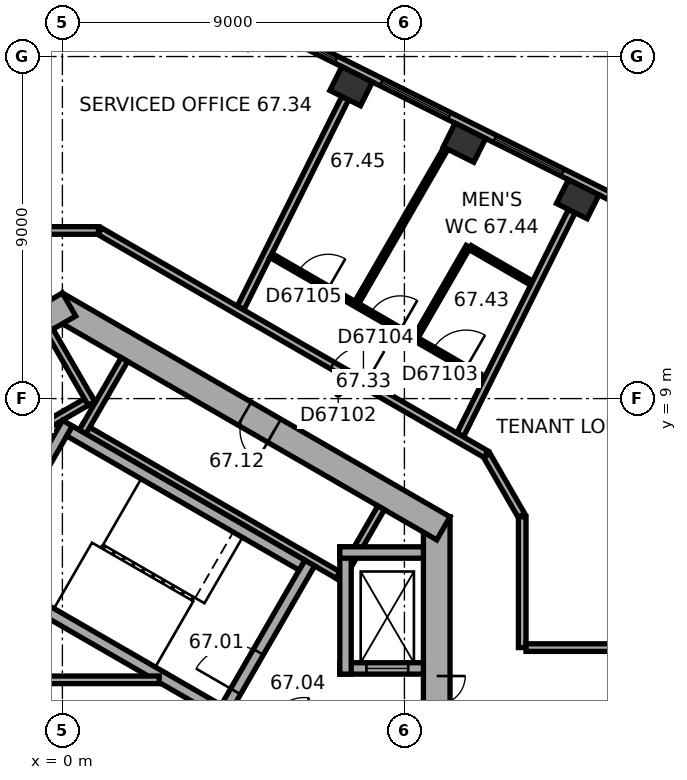
"""IFC4 building model, lengths in metres.
Left out: names, types, materials, properties, quantities, classifications, styles, units other than length and angle.
Written with IfcOpenShell. Run it as: python <this file> out.ifc"""

import sys

from ifc_helpers import new_model, si_unit, direction, frame, frame_2d, origin, origin_2d, place, context, subcontext, project, spatial, rectangle, extrude, element, fill, save


model = new_model("IFC4")
c1 = context("Model", 3, precision=1e-05, world=origin(), true_north=direction((0.0, 1.0)))
c2 = subcontext(c1, "Body", "Model", "MODEL_VIEW")
j1 = project(units=[si_unit("LENGTHUNIT", "METRE"), si_unit("PLANEANGLEUNIT", "RADIAN")], contexts=[c1])
p1 = place(None, origin())
s1 = spatial("IfcSite", under=j1, at=p1, CompositionType="ELEMENT")
p2 = place(p1, origin())
s2 = spatial("IfcBuilding", under=s1, at=p2, CompositionType="ELEMENT")
p3 = place(p2, frame((0.0, 0.0, 270.9)))
s3 = spatial("IfcBuildingStorey", under=s2, at=p3, CompositionType="ELEMENT", Elevation=270.9)
for number, where, z_axis, x_axis in (
    (1, (13.561, 14.246, 0.0), (0.0, 0.0, 1.0), (-0.895, 0.446, 0.0)),
    (2, (10.58, 15.732, 0.0), (0.0, 0.0, 1.0), (-0.895, 0.446, 0.0)),
    (3, (7.598, 17.219, 0.0), (0.0, 0.0, 1.0), (-0.895, 0.446, 0.0)),
):
    element("IfcColumn", number, at=place(p3, frame(where, z_axis=z_axis, x_axis=x_axis)), inside=s3, PredefinedType="COLUMN", context=c2, shape_type="SweptSolid", body=[
        extrude(rectangle(XDim=0.9, YDim=0.7, at=origin_2d()), origin(), (0.0, 0.0, 1.0), 3.7),
    ])
p4 = place(p3, frame((9.85, -5.889, 0.0), z_axis=(0.0, 0.0, 1.0), x_axis=(0.0, 1.0, 0.0)))
e4 = element("IfcWall", 4, at=p4, inside=s3, PredefinedType="SHEAR", context=c2, shape_type="SweptSolid", body=[
    extrude(rectangle(XDim=11.778, YDim=0.7, at=frame_2d((5.889, 0.0))), origin(), (0.0, 0.0, 1.0), 3.7),
])
p5 = place(p4, frame((6.089, 0.0, 0.0)))
e5 = element("IfcOpeningElement", 5, at=p5, cuts=e4, PredefinedType="OPENING", context=c2, shape_type="SweptSolid", body=[
    extrude(rectangle(XDim=1.5, YDim=2.1, at=frame_2d((0.75, 1.05))), frame((0.0, 0.36, 0.0), z_axis=(0.0, -1.0, 0.0), x_axis=(1.0, 0.0, 0.0)), (0.0, 0.0, 1.0), 0.72),
])
p6 = place(p4, frame((1.639, 0.0, 0.0)))
e6 = element("IfcOpeningElement", 6, at=p6, cuts=e4, PredefinedType="OPENING", context=c2, shape_type="SweptSolid", body=[
    extrude(rectangle(XDim=0.9, YDim=2.1, at=frame_2d((0.45, 1.05))), frame((0.0, 0.36, 0.0), z_axis=(0.0, -1.0, 0.0), x_axis=(1.0, 0.0, 0.0)), (0.0, 0.0, 1.0), 0.72),
])
p7 = place(p4, frame((4.239, 0.0, 0.0)))
e7 = element("IfcOpeningElement", 7, at=p7, cuts=e4, PredefinedType="OPENING", context=c2, shape_type="SweptSolid", body=[
    extrude(rectangle(XDim=0.9, YDim=2.1, at=frame_2d((0.45, 1.05))), frame((0.0, 0.36, 0.0), z_axis=(0.0, -1.0, 0.0), x_axis=(1.0, 0.0, 0.0)), (0.0, 0.0, 1.0), 0.72),
])
p8 = place(p3, frame((10.025, 5.586, 0.0), z_axis=(0.0, 0.0, 1.0), x_axis=(-0.866026453023, 0.499998182661, 0.0)))
e8 = element("IfcWall", 8, at=p8, inside=s3, PredefinedType="SHEAR", context=c2, shape_type="SweptSolid", body=[
    extrude(rectangle(XDim=11.778, YDim=0.7, at=frame_2d((5.889, 0.0))), origin(), (0.0, 0.0, 1.0), 3.7),
])
p9 = place(p8, frame((5.139, 0.0, 0.0)))
e9 = element("IfcOpeningElement", 9, at=p9, cuts=e8, PredefinedType="OPENING", context=c2, shape_type="SweptSolid", body=[
    extrude(rectangle(XDim=0.9, YDim=2.1, at=frame_2d((0.45, 1.05))), frame((0.0, 0.36, 0.0), z_axis=(0.0, -1.0, 0.0), x_axis=(1.0, 0.0, 0.0)), (0.0, 0.0, 1.0), 0.72),
])
p10 = place(p3, frame((0.175, 11.475, 0.0), z_axis=(0.0, 0.0, 1.0), x_axis=(-0.866026453023, -0.499998182661, 0.0)))
e10 = element("IfcWall", 10, at=p10, inside=s3, PredefinedType="SHEAR", context=c2, shape_type="SweptSolid", body=[
    extrude(rectangle(XDim=11.778, YDim=0.7, at=frame_2d((5.889, 0.0))), origin(), (0.0, 0.0, 1.0), 3.7),
])
p11 = place(p10, frame((6.089, 0.0, 0.0)))
e11 = element("IfcOpeningElement", 11, at=p11, cuts=e10, PredefinedType="OPENING", context=c2, shape_type="SweptSolid", body=[
    extrude(rectangle(XDim=1.5, YDim=2.1, at=frame_2d((0.75, 1.05))), frame((0.0, 0.36, 0.0), z_axis=(0.0, -1.0, 0.0), x_axis=(1.0, 0.0, 0.0)), (0.0, 0.0, 1.0), 0.72),
])
p12 = place(p10, frame((1.639, 0.0, 0.0)))
e12 = element("IfcOpeningElement", 12, at=p12, cuts=e10, PredefinedType="OPENING", context=c2, shape_type="SweptSolid", body=[
    extrude(rectangle(XDim=0.9, YDim=2.1, at=frame_2d((0.45, 1.05))), frame((0.0, 0.36, 0.0), z_axis=(0.0, -1.0, 0.0), x_axis=(1.0, 0.0, 0.0)), (0.0, 0.0, 1.0), 0.72),
])
p13 = place(p10, frame((4.239, 0.0, 0.0)))
e13 = element("IfcOpeningElement", 13, at=p13, cuts=e10, PredefinedType="OPENING", context=c2, shape_type="SweptSolid", body=[
    extrude(rectangle(XDim=0.9, YDim=2.1, at=frame_2d((0.45, 1.05))), frame((0.0, 0.36, 0.0), z_axis=(0.0, -1.0, 0.0), x_axis=(1.0, 0.0, 0.0)), (0.0, 0.0, 1.0), 0.72),
])
p14 = place(p3, frame((17.223, 12.923, 0.0), z_axis=(0.0, 0.0, 1.0), x_axis=(-0.894930561148, 0.44620543556, 0.0)))
e14 = element("IfcWall", 14, at=p14, inside=s3, PredefinedType="STANDARD", context=c2, shape_type="SweptSolid", body=[
    extrude(rectangle(XDim=17.731, YDim=0.2, at=frame_2d((8.866, 0.0))), origin(), (0.0, 0.0, 1.0), 3.7),
])
p15 = place(p14, frame((1.202, 0.0, 0.9)))
e15 = element("IfcOpeningElement", 15, at=p15, cuts=e14, PredefinedType="OPENING", context=c2, shape_type="SweptSolid", body=[
    extrude(rectangle(XDim=2.0, YDim=2.0, at=frame_2d((1.0, 1.0))), frame((0.0, 0.11, 0.0), z_axis=(0.0, -1.0, 0.0), x_axis=(1.0, 0.0, 0.0)), (0.0, 0.0, 1.0), 0.22),
])
p16 = place(p14, frame((4.533, 0.0, 0.9)))
e16 = element("IfcOpeningElement", 16, at=p16, cuts=e14, PredefinedType="OPENING", context=c2, shape_type="SweptSolid", body=[
    extrude(rectangle(XDim=2.0, YDim=2.0, at=frame_2d((1.0, 1.0))), frame((0.0, 0.11, 0.0), z_axis=(0.0, -1.0, 0.0), x_axis=(1.0, 0.0, 0.0)), (0.0, 0.0, 1.0), 0.22),
])
p17 = place(p14, frame((7.865, 0.0, 0.9)))
e17 = element("IfcOpeningElement", 17, at=p17, cuts=e14, PredefinedType="OPENING", context=c2, shape_type="SweptSolid", body=[
    extrude(rectangle(XDim=2.0, YDim=2.0, at=frame_2d((1.0, 1.0))), frame((0.0, 0.11, 0.0), z_axis=(0.0, -1.0, 0.0), x_axis=(1.0, 0.0, 0.0)), (0.0, 0.0, 1.0), 0.22),
])
p18 = place(p14, frame((11.197, 0.0, 0.9)))
e18 = element("IfcOpeningElement", 18, at=p18, cuts=e14, PredefinedType="OPENING", context=c2, shape_type="SweptSolid", body=[
    extrude(rectangle(XDim=2.0, YDim=2.0, at=frame_2d((1.0, 1.0))), frame((0.0, 0.11, 0.0), z_axis=(0.0, -1.0, 0.0), x_axis=(1.0, 0.0, 0.0)), (0.0, 0.0, 1.0), 0.22),
])
p19 = place(p14, frame((14.528, 0.0, 0.9)))
e19 = element("IfcOpeningElement", 19, at=p19, cuts=e14, PredefinedType="OPENING", context=c2, shape_type="SweptSolid", body=[
    extrude(rectangle(XDim=2.0, YDim=2.0, at=frame_2d((1.0, 1.0))), frame((0.0, 0.11, 0.0), z_axis=(0.0, -1.0, 0.0), x_axis=(1.0, 0.0, 0.0)), (0.0, 0.0, 1.0), 0.22),
])
p20 = place(p3, frame((7.424, 4.259, 0.0), z_axis=(0.0, 0.0, 1.0), x_axis=(-0.866026010844, 0.49999894854, 0.0)))
e20 = element("IfcWall", 20, at=p20, inside=s3, PredefinedType="PARTITIONING", context=c2, shape_type="SweptSolid", body=[
    extrude(rectangle(XDim=8.0, YDim=0.2, at=frame_2d((4.0, 0.0))), origin(), (0.0, 0.0, 1.0), 3.42),
])
for number, where, z_axis, x_axis in (
    (21, (7.287, 4.222, 0.0), (0.0, 0.0, 1.0), (0.5, 0.866, 0.0)),
    (22, (0.532, 8.122, 0.0), (0.0, 0.0, 1.0), (0.5, 0.866, 0.0)),
):
    element("IfcWall", number, at=place(p3, frame(where, z_axis=z_axis, x_axis=x_axis)), inside=s3, PredefinedType="PARTITIONING", context=c2, shape_type="SweptSolid", body=[
        extrude(rectangle(XDim=2.2, YDim=0.2, at=frame_2d((1.1, 0.0))), origin(), (0.0, 0.0, 1.0), 3.42),
    ])
p21 = place(p3, frame((0.803, 9.009, 0.0), z_axis=(0.0, 0.0, 1.0), x_axis=(-0.866028230842, -0.499995103361, 0.0)))
e23 = element("IfcWall", 23, at=p21, inside=s3, PredefinedType="PARTITIONING", context=c2, shape_type="SweptSolid", body=[
    extrude(rectangle(XDim=5.4, YDim=0.2, at=frame_2d((2.7, 0.0))), origin(), (0.0, 0.0, 1.0), 3.42),
])
p22 = place(p3, frame((0.767, 8.872, 0.0), z_axis=(0.0, 0.0, 1.0), x_axis=(-0.499994660107, 0.866028486751, 0.0)))
e24 = element("IfcWall", 24, at=p22, inside=s3, PredefinedType="PARTITIONING", context=c2, shape_type="SweptSolid", body=[
    extrude(rectangle(XDim=2.2, YDim=0.2, at=frame_2d((1.1, 0.0))), origin(), (0.0, 0.0, 1.0), 3.42),
])
p23 = place(p3, frame((4.158, 0.602, 0.0), z_axis=(0.0, 0.0, 1.0), x_axis=(0.499977259774, 0.866038532462, 0.0)))
e25 = element("IfcWall", 25, at=p23, inside=s3, PredefinedType="SHEAR", context=c2, shape_type="SweptSolid", body=[
    extrude(rectangle(XDim=4.7, YDim=0.3, at=frame_2d((2.35, 0.0))), origin(), (0.0, 0.0, 1.0), 3.42),
])
p24 = place(p23, frame((0.8, 0.0, 0.0)))
e26 = element("IfcOpeningElement", 26, at=p24, cuts=e25, PredefinedType="OPENING", context=c2, shape_type="SweptSolid", body=[
    extrude(rectangle(XDim=1.2, YDim=2.1, at=frame_2d((0.6, 1.05))), frame((0.0, 0.16, 0.0), z_axis=(0.0, -1.0, 0.0), x_axis=(1.0, 0.0, 0.0)), (0.0, 0.0, 1.0), 0.32),
])
p25 = place(p3, frame((-2.216, 4.282, 0.0), z_axis=(0.0, 0.0, 1.0), x_axis=(0.499977259774, 0.866038532462, 0.0)))
e27 = element("IfcWall", 27, at=p25, inside=s3, PredefinedType="SHEAR", context=c2, shape_type="SweptSolid", body=[
    extrude(rectangle(XDim=4.7, YDim=0.3, at=frame_2d((2.35, 0.0))), origin(), (0.0, 0.0, 1.0), 3.42),
])
for number, where, z_axis, x_axis in (
    (28, (4.103, 0.807, 0.0), (0.0, 0.0, 1.0), (-0.866, 0.5, 0.0)),
    (29, (6.303, 4.617, 0.0), (0.0, 0.0, 1.0), (-0.866, 0.5, 0.0)),
):
    element("IfcWall", number, at=place(p3, frame(where, z_axis=z_axis, x_axis=x_axis)), inside=s3, PredefinedType="SHEAR", context=c2, shape_type="SweptSolid", body=[
        extrude(rectangle(XDim=7.06, YDim=0.3, at=frame_2d((3.53, 0.0))), origin(), (0.0, 0.0, 1.0), 3.42),
    ])
p26 = place(p3, frame((7.3, 1.9, 0.0), z_axis=(0.0, 0.0, 1.0), x_axis=(1.0, 0.0, 0.0)))
e30 = element("IfcWall", 30, at=p26, inside=s3, PredefinedType="SHEAR", context=c2, shape_type="SweptSolid", body=[
    extrude(rectangle(XDim=2.2, YDim=0.3, at=frame_2d((1.1, 0.0))), origin(), (0.0, 0.0, 1.0), 3.42),
])
p27 = place(p26, frame((0.7, 0.0, 0.0)))
e31 = element("IfcOpeningElement", 31, at=p27, cuts=e30, PredefinedType="OPENING", context=c2, shape_type="SweptSolid", body=[
    extrude(rectangle(XDim=1.1, YDim=2.1, at=frame_2d((0.55, 1.05))), frame((0.0, 0.16, 0.0), z_axis=(0.0, -1.0, 0.0), x_axis=(1.0, 0.0, 0.0)), (0.0, 0.0, 1.0), 0.32),
])
p28 = place(p3, frame((7.45, 1.75, 0.0), z_axis=(0.0, 0.0, 1.0), x_axis=(0.0, 1.0, 0.0)))
e32 = element("IfcWall", 32, at=p28, inside=s3, PredefinedType="SHEAR", context=c2, shape_type="SweptSolid", body=[
    extrude(rectangle(XDim=3.35, YDim=0.3, at=frame_2d((1.675, 0.0))), origin(), (0.0, 0.0, 1.0), 3.42),
])
p29 = place(p3, frame((7.3, 4.95, 0.0), z_axis=(0.0, 0.0, 1.0), x_axis=(1.0, 0.0, 0.0)))
e33 = element("IfcWall", 33, at=p29, inside=s3, PredefinedType="SHEAR", context=c2, shape_type="SweptSolid", body=[
    extrude(rectangle(XDim=2.2, YDim=0.3, at=frame_2d((1.1, 0.0))), origin(), (0.0, 0.0, 1.0), 3.42),
])
p30 = place(p3, frame((-2.72, 1.6, 0.0), z_axis=(0.0, 0.0, 1.0), x_axis=(1.0, 0.0, 0.0)))
e34 = element("IfcWall", 34, at=p30, inside=s3, PredefinedType="PARTITIONING", context=c2, shape_type="SweptSolid", body=[
    extrude(rectangle(XDim=5.269, YDim=0.2, at=frame_2d((2.634, 0.0))), origin(), (0.0, 0.0, 1.0), 3.42),
])
p31 = place(p3, frame((0.95, 13.423, 0.0), z_axis=(0.0, 0.0, 1.0), x_axis=(-1.0, 0.0, 0.0)))
e35 = element("IfcWall", 35, at=p31, inside=s3, PredefinedType="PARTITIONING", context=c2, shape_type="SweptSolid", body=[
    extrude(rectangle(XDim=1.9, YDim=0.2, at=frame_2d((0.95, 0.0))), origin(), (0.0, 0.0, 1.0), 3.42),
])
p32 = place(p3, frame((7.442, 16.906, 0.0), z_axis=(0.0, 0.0, 1.0), x_axis=(-0.446183401262, -0.894941546939, 0.0)))
e36 = element("IfcWall", 36, at=p32, inside=s3, PredefinedType="PARTITIONING", context=c2, shape_type="SweptSolid", body=[
    extrude(rectangle(XDim=6.163, YDim=0.2, at=frame_2d((3.082, 0.0))), origin(), (0.0, 0.0, 1.0), 3.42),
])
p33 = place(p3, frame((10.091, 15.585, 0.0), z_axis=(0.0, 0.0, 1.0), x_axis=(-0.499969186147, -0.86604319344, 0.0)))
e37 = element("IfcWall", 37, at=p33, inside=s3, PredefinedType="PARTITIONING", context=c2, shape_type="SweptSolid", body=[
    extrude(rectangle(XDim=4.682, YDim=0.12, at=frame_2d((2.341, 0.0))), origin(), (0.0, 0.0, 1.0), 2.87),
])
p34 = place(p3, frame((10.679, 13.003, 0.0), z_axis=(0.0, 0.0, 1.0), x_axis=(-0.500048966069, -0.865997131366, 0.0)))
e38 = element("IfcWall", 38, at=p34, inside=s3, PredefinedType="PARTITIONING", context=c2, shape_type="SweptSolid", body=[
    extrude(rectangle(XDim=2.74, YDim=0.12, at=frame_2d((1.37, 0.0))), origin(), (0.0, 0.0, 1.0), 3.42),
])
p35 = place(p3, frame((11.097, 9.528, 0.0), z_axis=(0.0, 0.0, 1.0), x_axis=(-0.866039938485, 0.499974824316, 0.0)))
e39 = element("IfcWall", 39, at=p35, inside=s3, PredefinedType="PARTITIONING", context=c2, shape_type="SweptSolid", body=[
    extrude(rectangle(XDim=6.476, YDim=0.12, at=frame_2d((3.238, 0.0))), origin(), (0.0, 0.0, 1.0), 3.42),
])
p36 = place(p35, frame((0.55, 0.0, 0.0)))
e40 = element("IfcOpeningElement", 40, at=p36, cuts=e39, PredefinedType="OPENING", context=c2, shape_type="SweptSolid", body=[
    extrude(rectangle(XDim=1.0, YDim=2.1, at=frame_2d((0.5, 1.05))), frame((0.0, 0.07, 0.0), z_axis=(0.0, -1.0, 0.0), x_axis=(1.0, 0.0, 0.0)), (0.0, 0.0, 1.0), 0.14),
])
p37 = place(p35, frame((2.55, 0.0, 0.0)))
e41 = element("IfcOpeningElement", 41, at=p37, cuts=e39, PredefinedType="OPENING", context=c2, shape_type="SweptSolid", body=[
    extrude(rectangle(XDim=0.9, YDim=2.1, at=frame_2d((0.45, 1.05))), frame((0.0, 0.07, 0.0), z_axis=(0.0, -1.0, 0.0), x_axis=(1.0, 0.0, 0.0)), (0.0, 0.0, 1.0), 0.14),
])
p38 = place(p35, frame((4.738, 0.0, 0.0)))
e42 = element("IfcOpeningElement", 42, at=p38, cuts=e39, PredefinedType="OPENING", context=c2, shape_type="SweptSolid", body=[
    extrude(rectangle(XDim=0.9, YDim=2.1, at=frame_2d((0.45, 1.05))), frame((0.0, 0.07, 0.0), z_axis=(0.0, -1.0, 0.0), x_axis=(1.0, 0.0, 0.0)), (0.0, 0.0, 1.0), 0.14),
])
p39 = place(p3, frame((11.15, 7.534, 0.0), z_axis=(0.0, 0.0, 1.0), x_axis=(-0.866026603062, 0.499997922785, 0.0)))
e43 = element("IfcWall", 43, at=p39, inside=s3, PredefinedType="PARTITIONING", context=c2, shape_type="SweptSolid", body=[
    extrude(rectangle(XDim=11.738, YDim=0.2, at=frame_2d((5.869, 0.0))), origin(), (0.0, 0.0, 1.0), 3.42),
])
p40 = place(p39, frame((3.676, 0.0, 0.0)))
e44 = element("IfcOpeningElement", 44, at=p40, cuts=e43, PredefinedType="OPENING", context=c2, shape_type="SweptSolid", body=[
    extrude(rectangle(XDim=1.0, YDim=2.1, at=frame_2d((0.5, 1.05))), frame((0.0, 0.11, 0.0), z_axis=(0.0, -1.0, 0.0), x_axis=(1.0, 0.0, 0.0)), (0.0, 0.0, 1.0), 0.22),
])
p41 = place(p3, frame((12.08, 5.924, 0.0), z_axis=(0.0, 0.0, 1.0), x_axis=(-0.500004960326, 0.86602253992, 0.0)))
e45 = element("IfcWall", 45, at=p41, inside=s3, PredefinedType="PARTITIONING", context=c2, shape_type="SweptSolid", body=[
    extrude(rectangle(XDim=1.82, YDim=0.2, at=frame_2d((0.91, 0.0))), origin(), (0.0, 0.0, 1.0), 3.42),
])
p42 = place(p3, frame((12.1, 2.448, 0.0), z_axis=(0.0, 0.0, 1.0), x_axis=(0.0, 1.0, 0.0)))
e46 = element("IfcWall", 46, at=p42, inside=s3, PredefinedType="PARTITIONING", context=c2, shape_type="SweptSolid", body=[
    extrude(rectangle(XDim=3.441, YDim=0.2, at=frame_2d((1.72, 0.0))), origin(), (0.0, 0.0, 1.0), 3.42),
])
p43 = place(p3, frame((12.349, 12.038, 0.0), z_axis=(0.0, 0.0, 1.0), x_axis=(-0.866039825209, 0.499975020527, 0.0)))
e47 = element("IfcWall", 47, at=p43, inside=s3, PredefinedType="PARTITIONING", context=c2, shape_type="SweptSolid", body=[
    extrude(rectangle(XDim=1.869, YDim=0.12, at=frame_2d((0.934, 0.0))), origin(), (0.0, 0.0, 1.0), 3.42),
])
p44 = place(p3, frame((13.405, 13.933, 0.0), z_axis=(0.0, 0.0, 1.0), x_axis=(-0.446187838644, -0.894939334618, 0.0)))
e48 = element("IfcWall", 48, at=p44, inside=s3, PredefinedType="PARTITIONING", context=c2, shape_type="SweptSolid", body=[
    extrude(rectangle(XDim=6.571, YDim=0.2, at=frame_2d((3.286, 0.0))), origin(), (0.0, 0.0, 1.0), 3.42),
])
p45 = place(p3, frame((18.45, 2.448, 0.0), z_axis=(0.0, 0.0, 1.0), x_axis=(-1.0, 0.0, 0.0)))
e49 = element("IfcWall", 49, at=p45, inside=s3, PredefinedType="PARTITIONING", context=c2, shape_type="SweptSolid", body=[
    extrude(rectangle(XDim=6.25, YDim=0.2, at=frame_2d((3.125, 0.0))), origin(), (0.0, 0.0, 1.0), 3.42),
])
p46 = place(p45, frame((2.625, 0.0, 0.0)))
e50 = element("IfcOpeningElement", 50, at=p46, cuts=e49, PredefinedType="OPENING", context=c2, shape_type="SweptSolid", body=[
    extrude(rectangle(XDim=1.0, YDim=2.1, at=frame_2d((0.5, 1.05))), frame((0.0, 0.11, 0.0), z_axis=(0.0, -1.0, 0.0), x_axis=(1.0, 0.0, 0.0)), (0.0, 0.0, 1.0), 0.22),
])
p47 = place(p16, origin())
e51 = element("IfcWindow", 51, at=p47, inside=s3, PartitioningType="SINGLE_PANEL", PredefinedType="WINDOW", context=c2, shape_type="SweptSolid", body=[
    extrude(rectangle(XDim=2.0, YDim=2.0, at=frame_2d((1.0, 1.0))), frame((0.0, 0.03, 0.0), z_axis=(0.0, -1.0, 0.0), x_axis=(1.0, 0.0, 0.0)), (0.0, 0.0, 1.0), 0.06),
])
fill(e16, e51)
p48 = place(p17, origin())
e52 = element("IfcWindow", 52, at=p48, inside=s3, PartitioningType="SINGLE_PANEL", PredefinedType="WINDOW", context=c2, shape_type="SweptSolid", body=[
    extrude(rectangle(XDim=2.0, YDim=2.0, at=frame_2d((1.0, 1.0))), frame((0.0, 0.03, 0.0), z_axis=(0.0, -1.0, 0.0), x_axis=(1.0, 0.0, 0.0)), (0.0, 0.0, 1.0), 0.06),
])
fill(e17, e52)
p49 = place(p18, origin())
e53 = element("IfcWindow", 53, at=p49, inside=s3, PartitioningType="SINGLE_PANEL", PredefinedType="WINDOW", context=c2, shape_type="SweptSolid", body=[
    extrude(rectangle(XDim=2.0, YDim=2.0, at=frame_2d((1.0, 1.0))), frame((0.0, 0.03, 0.0), z_axis=(0.0, -1.0, 0.0), x_axis=(1.0, 0.0, 0.0)), (0.0, 0.0, 1.0), 0.06),
])
fill(e18, e53)
p50 = place(p5, origin())
e54 = element("IfcDoor", 54, at=p50, inside=s3, OperationType="DOUBLE_DOOR_SINGLE_SWING", PredefinedType="DOOR", context=c2, shape_type="SweptSolid", body=[
    extrude(rectangle(XDim=1.5, YDim=2.1, at=frame_2d((0.75, 1.05))), frame((0.0, 0.025, 0.0), z_axis=(0.0, -1.0, 0.0), x_axis=(1.0, 0.0, 0.0)), (0.0, 0.0, 1.0), 0.05),
])
fill(e5, e54)
p51 = place(p24, origin())
e55 = element("IfcDoor", 55, at=p51, inside=s3, OperationType="SINGLE_SWING_RIGHT", PredefinedType="DOOR", context=c2, shape_type="SweptSolid", body=[
    extrude(rectangle(XDim=1.2, YDim=2.1, at=frame_2d((0.6, 1.05))), frame((0.0, 0.025, 0.0), z_axis=(0.0, -1.0, 0.0), x_axis=(1.0, 0.0, 0.0)), (0.0, 0.0, 1.0), 0.05),
])
fill(e26, e55)
p52 = place(p9, origin())
e56 = element("IfcDoor", 56, at=p52, inside=s3, OperationType="SINGLE_SWING_LEFT", PredefinedType="DOOR", context=c2, shape_type="SweptSolid", body=[
    extrude(rectangle(XDim=0.9, YDim=2.1, at=frame_2d((0.45, 1.05))), frame((0.0, 0.025, 0.0), z_axis=(0.0, -1.0, 0.0), x_axis=(1.0, 0.0, 0.0)), (0.0, 0.0, 1.0), 0.05),
])
fill(e9, e56)
p53 = place(p27, origin())
e57 = element("IfcDoor", 57, at=p53, inside=s3, OperationType="DOUBLE_DOOR_SLIDING", PredefinedType="DOOR", context=c2, shape_type="SweptSolid", body=[
    extrude(rectangle(XDim=1.1, YDim=2.1, at=frame_2d((0.55, 1.05))), frame((0.0, 0.025, 0.0), z_axis=(0.0, -1.0, 0.0), x_axis=(1.0, 0.0, 0.0)), (0.0, 0.0, 1.0), 0.05),
])
fill(e31, e57)
p54 = place(p40, origin())
e58 = element("IfcDoor", 58, at=p54, inside=s3, OperationType="SINGLE_SWING_LEFT", PredefinedType="DOOR", context=c2, shape_type="SweptSolid", body=[
    extrude(rectangle(XDim=1.0, YDim=2.1, at=frame_2d((0.5, 1.05))), frame((0.0, 0.025, 0.0), z_axis=(0.0, -1.0, 0.0), x_axis=(1.0, 0.0, 0.0)), (0.0, 0.0, 1.0), 0.05),
])
fill(e44, e58)
p55 = place(p36, origin())
e59 = element("IfcDoor", 59, at=p55, inside=s3, OperationType="SINGLE_SWING_LEFT", PredefinedType="DOOR", context=c2, shape_type="SweptSolid", body=[
    extrude(rectangle(XDim=1.0, YDim=2.1, at=frame_2d((0.5, 1.05))), frame((0.0, 0.025, 0.0), z_axis=(0.0, -1.0, 0.0), x_axis=(1.0, 0.0, 0.0)), (0.0, 0.0, 1.0), 0.05),
])
fill(e40, e59)
p56 = place(p37, origin())
e60 = element("IfcDoor", 60, at=p56, inside=s3, OperationType="SINGLE_SWING_LEFT", PredefinedType="DOOR", context=c2, shape_type="SweptSolid", body=[
    extrude(rectangle(XDim=0.9, YDim=2.1, at=frame_2d((0.45, 1.05))), frame((0.0, 0.025, 0.0), z_axis=(0.0, -1.0, 0.0), x_axis=(1.0, 0.0, 0.0)), (0.0, 0.0, 1.0), 0.05),
])
fill(e41, e60)
p57 = place(p38, origin())
e61 = element("IfcDoor", 61, at=p57, inside=s3, OperationType="SINGLE_SWING_LEFT", PredefinedType="DOOR", context=c2, shape_type="SweptSolid", body=[
    extrude(rectangle(XDim=0.9, YDim=2.1, at=frame_2d((0.45, 1.05))), frame((0.0, 0.025, 0.0), z_axis=(0.0, -1.0, 0.0), x_axis=(1.0, 0.0, 0.0)), (0.0, 0.0, 1.0), 0.05),
])
fill(e42, e61)
save(model, sys.argv[1])
